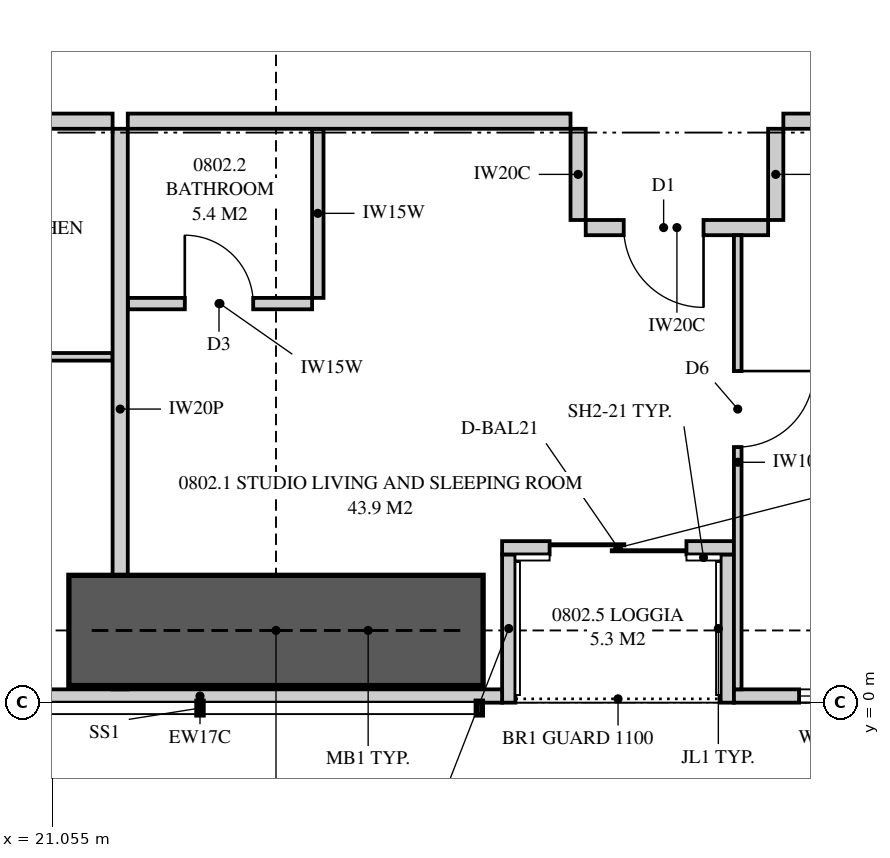
"""IFC4 building model, lengths in metres.
Left out: names, types, materials, properties, quantities, classifications, styles, units other than length and angle.
Written with IfcOpenShell. Run it as: python <this file> out.ifc"""

import sys

from ifc_helpers import new_model, si_unit, direction, frame, frame_2d, origin, place, context, subcontext, project, spatial, polyline, rectangle, outline, extrude, element, fill, save


model = new_model("IFC4")
c1 = context("Model", 3, precision=1e-05, world=origin(), true_north=direction((0.0, 1.0)))
c2 = subcontext(c1, "Body", "Model", "MODEL_VIEW")
j1 = project(units=[si_unit("LENGTHUNIT", "METRE"), si_unit("PLANEANGLEUNIT", "RADIAN")], contexts=[c1])
p1 = place(None, origin())
s1 = spatial("IfcSite", under=j1, at=p1, CompositionType="ELEMENT")
p2 = place(p1, origin())
s2 = spatial("IfcBuilding", under=s1, at=p2, CompositionType="ELEMENT")
p3 = place(p2, frame((0.0, 0.0, 34.4)))
s3 = spatial("IfcBuildingStorey", under=s2, at=p3, CompositionType="ELEMENT", Elevation=34.4)
p4 = place(p3, frame((19.025, 0.087, 0.0), z_axis=(0.0, 0.0, 1.0), x_axis=(1.0, 0.0, 0.0)))
e1 = element("IfcWall", 1, at=p4, inside=s3, PredefinedType="SOLIDWALL", context=c2, shape_type="SweptSolid", body=[
    extrude(rectangle(XDim=7.95, YDim=0.175, at=frame_2d((3.975, 0.0))), origin(), (0.0, 0.0, 1.0), 2.15),
])
p5 = place(p3, frame((30.025, 0.087, 0.0), z_axis=(0.0, 0.0, 1.0), x_axis=(1.0, 0.0, 0.0)))
e2 = element("IfcWall", 2, at=p5, inside=s3, PredefinedType="SOLIDWALL", context=c2, shape_type="SweptSolid", body=[
    extrude(outline(polyline([(0.0, 0.0), (8.075, 0.0), (8.075, 3.11), (5.179, 3.11), (5.179, 2.15), (5.131, 2.15), (5.131, 3.11), (4.975, 3.11), (4.975, 2.15), (0.0, 2.15), (0.0, 0.0)])), frame((0.0, 0.087, 0.0), z_axis=(0.0, -1.0, 0.0), x_axis=(1.0, 0.0, 0.0)), (0.0, 0.0, 1.0), 0.175),
])
p6 = place(p5, frame((0.857, 0.0, 0.4)))
e3 = element("IfcOpeningElement", 3, at=p6, cuts=e2, PredefinedType="OPENING", context=c2, shape_type="SweptSolid", body=[
    extrude(rectangle(XDim=1.2, YDim=1.7, at=frame_2d((0.6, 0.85))), frame((0.0, 0.097, 0.0), z_axis=(0.0, -1.0, 0.0), x_axis=(1.0, 0.0, 0.0)), (0.0, 0.0, 1.0), 0.195),
])
p7 = place(p3, frame((26.975, 2.038, 0.0), z_axis=(0.0, 0.0, 1.0), x_axis=(1.0, 0.0, 0.0)))
e4 = element("IfcWall", 4, at=p7, inside=s3, PredefinedType="SOLIDWALL", context=c2, shape_type="SweptSolid", body=[
    extrude(rectangle(XDim=3.05, YDim=0.175, at=frame_2d((1.525, 0.0))), origin(), (0.0, 0.0, 1.0), 3.11),
])
p8 = place(p7, frame((0.625, 0.0, 0.0)))
e5 = element("IfcOpeningElement", 5, at=p8, cuts=e4, PredefinedType="OPENING", context=c2, shape_type="SweptSolid", body=[
    extrude(rectangle(XDim=1.8, YDim=2.1, at=frame_2d((0.9, 1.05))), frame((0.0, 0.097, 0.0), z_axis=(0.0, -1.0, 0.0), x_axis=(1.0, 0.0, 0.0)), (0.0, 0.0, 1.0), 0.195),
])
for number, where, z_axis, x_axis in (
    (6, (27.062, 0.0, 0.0), (0.0, 0.0, 1.0), (0.0, 1.0, 0.0)),
    (7, (29.938, 0.0, 0.0), (0.0, 0.0, 1.0), (0.0, 1.0, 0.0)),
):
    element("IfcWall", number, at=place(p3, frame(where, z_axis=z_axis, x_axis=x_axis)), inside=s3, PredefinedType="SOLIDWALL", context=c2, shape_type="SweptSolid", body=[
        extrude(outline(polyline([(0.0, 0.0), (1.95, 0.0), (1.95, 3.11), (1.75, 3.11), (1.75, 2.15), (0.15, 2.15), (0.15, 3.11), (0.0, 3.11), (0.0, 0.0)])), frame((0.0, 0.087, 0.0), z_axis=(0.0, -1.0, 0.0), x_axis=(1.0, 0.0, 0.0)), (0.0, 0.0, 1.0), 0.175),
    ])
p9 = place(p3, frame((21.95, 0.175, 0.0), z_axis=(0.0, 0.0, 1.0), x_axis=(0.0, 1.0, 0.0)))
e8 = element("IfcWall", 8, at=p9, inside=s3, PredefinedType="PARTITIONING", context=c2, shape_type="SweptSolid", body=[
    extrude(outline(polyline([(0.529, 2.15), (0.0, 2.15), (0.0, 0.0), (0.529, 0.0), (0.529, 0.09), (1.021, 0.09), (1.021, 0.0), (7.375, 0.0), (7.375, 3.11), (1.685, 3.11), (1.685, 2.15), (1.021, 2.15), (1.021, 2.06), (0.529, 2.06), (0.529, 2.15)])), frame((0.0, 0.1, 0.0), z_axis=(0.0, -1.0, 0.0), x_axis=(1.0, 0.0, 0.0)), (0.0, 0.0, 1.0), 0.2),
])
p10 = place(p3, frame((17.725, 7.65, 0.0), z_axis=(0.0, 0.0, 1.0), x_axis=(1.0, 0.0, 0.0)))
e9 = element("IfcWall", 9, at=p10, inside=s3, PredefinedType="PARTITIONING", context=c2, shape_type="SweptSolid", body=[
    extrude(rectangle(XDim=4.125, YDim=0.2, at=frame_2d((2.062, 0.0))), origin(), (0.0, 0.0, 1.0), 3.11),
])
p11 = place(p10, frame((0.2, 0.0, 0.0)))
e10 = element("IfcOpeningElement", 10, at=p11, cuts=e9, PredefinedType="OPENING", context=c2, shape_type="SweptSolid", body=[
    extrude(rectangle(XDim=1.05, YDim=2.2, at=frame_2d((0.525, 1.1))), frame((0.0, 0.11, 0.0), z_axis=(0.0, -1.0, 0.0), x_axis=(1.0, 0.0, 0.0)), (0.0, 0.0, 1.0), 0.22),
])
p12 = place(p3, frame((19.2, 4.55, 0.0), z_axis=(0.0, 0.0, 1.0), x_axis=(1.0, 0.0, 0.0)))
e11 = element("IfcWall", 11, at=p12, inside=s3, PredefinedType="PARTITIONING", context=c2, shape_type="SweptSolid", body=[
    extrude(rectangle(XDim=2.65, YDim=0.1, at=frame_2d((1.325, 0.0))), origin(), (0.0, 0.0, 1.0), 3.11),
])
p13 = place(p12, frame((0.85, 0.0, 0.0)))
e12 = element("IfcOpeningElement", 12, at=p13, cuts=e11, PredefinedType="OPENING", context=c2, shape_type="SweptSolid", body=[
    extrude(rectangle(XDim=0.9, YDim=2.1, at=frame_2d((0.45, 1.05))), frame((0.0, 0.06, 0.0), z_axis=(0.0, -1.0, 0.0), x_axis=(1.0, 0.0, 0.0)), (0.0, 0.0, 1.0), 0.12),
])
p14 = place(p3, frame((22.05, 7.65, 0.0), z_axis=(0.0, 0.0, 1.0), x_axis=(1.0, 0.0, 0.0)))
e13 = element("IfcWall", 13, at=p14, inside=s3, PredefinedType="PARTITIONING", context=c2, shape_type="SweptSolid", body=[
    extrude(outline(polyline([(0.0, 0.0), (5.825, 0.0), (5.825, 3.11), (2.287, 3.11), (2.287, 2.541), (1.613, 2.541), (1.613, 3.11), (0.0, 3.11), (0.0, 0.0)])), frame((0.0, 0.1, 0.0), z_axis=(0.0, -1.0, 0.0), x_axis=(1.0, 0.0, 0.0)), (0.0, 0.0, 1.0), 0.2),
])
p15 = place(p3, frame((22.05, 5.25, 0.0), z_axis=(0.0, 0.0, 1.0), x_axis=(1.0, 0.0, 0.0)))
e14 = element("IfcWall", 14, at=p15, inside=s3, PredefinedType="PLUMBINGWALL", context=c2, shape_type="SweptSolid", body=[
    extrude(outline(polyline([(0.0, 0.0), (2.425, 0.0), (2.425, 3.11), (2.262, 3.11), (2.262, 2.541), (1.638, 2.541), (1.638, 3.11), (0.0, 3.11), (0.0, 0.0)])), frame((0.0, 0.075, 0.0), z_axis=(0.0, -1.0, 0.0), x_axis=(1.0, 0.0, 0.0)), (0.0, 0.0, 1.0), 0.15),
])
p16 = place(p15, frame((0.75, 0.0, 0.0)))
e15 = element("IfcOpeningElement", 15, at=p16, cuts=e14, PredefinedType="OPENING", context=c2, shape_type="SweptSolid", body=[
    extrude(rectangle(XDim=0.9, YDim=2.1, at=frame_2d((0.45, 1.05))), frame((0.0, 0.085, 0.0), z_axis=(0.0, -1.0, 0.0), x_axis=(1.0, 0.0, 0.0)), (0.0, 0.0, 1.0), 0.17),
])
p17 = place(p3, frame((24.55, 5.325, 0.0), z_axis=(0.0, 0.0, 1.0), x_axis=(0.0, 1.0, 0.0)))
e16 = element("IfcWall", 16, at=p17, inside=s3, PredefinedType="PLUMBINGWALL", context=c2, shape_type="SweptSolid", body=[
    extrude(rectangle(XDim=2.225, YDim=0.15, at=frame_2d((1.113, 0.0))), origin(), (0.0, 0.0, 1.0), 3.11),
])
p18 = place(p3, frame((30.075, 0.175, 0.0), z_axis=(0.0, 0.0, 1.0), x_axis=(0.0, 1.0, 0.0)))
e17 = element("IfcWall", 17, at=p18, inside=s3, PredefinedType="PARTITIONING", context=c2, shape_type="SweptSolid", body=[
    extrude(outline(polyline([(0.0, 0.0), (5.975, 0.0), (5.975, 3.11), (1.635, 3.11), (1.635, 2.15), (0.0, 2.15), (0.0, 3.11), (0.0, 0.0)])), frame((0.0, 0.05, 0.0), z_axis=(0.0, -1.0, 0.0), x_axis=(1.0, 0.0, 0.0)), (0.0, 0.0, 1.0), 0.1),
])
p19 = place(p18, frame((3.188, 0.0, 0.0)))
e18 = element("IfcOpeningElement", 18, at=p19, cuts=e17, PredefinedType="OPENING", context=c2, shape_type="SweptSolid", body=[
    extrude(rectangle(XDim=1.0, YDim=2.1, at=frame_2d((0.5, 1.05))), frame((0.0, 0.06, 0.0), z_axis=(0.0, -1.0, 0.0), x_axis=(1.0, 0.0, 0.0)), (0.0, 0.0, 1.0), 0.12),
])
p20 = place(p3, frame((30.675, 7.65, 0.0), z_axis=(0.0, 0.0, 1.0), x_axis=(1.0, 0.0, 0.0)))
e19 = element("IfcWall", 19, at=p20, inside=s3, PredefinedType="PARTITIONING", context=c2, shape_type="SweptSolid", body=[
    extrude(outline(polyline([(0.0, 0.0), (5.425, 0.0), (5.425, 3.11), (4.662, 3.11), (4.662, 2.541), (3.988, 2.541), (3.988, 3.11), (0.0, 3.11), (0.0, 0.0)])), frame((0.0, 0.1, 0.0), z_axis=(0.0, -1.0, 0.0), x_axis=(1.0, 0.0, 0.0)), (0.0, 0.0, 1.0), 0.2),
])
p21 = place(p3, frame((28.075, 6.25, 0.0), z_axis=(0.0, 0.0, 1.0), x_axis=(1.0, 0.0, 0.0)))
e20 = element("IfcWall", 20, at=p21, inside=s3, PredefinedType="PARTITIONING", context=c2, shape_type="SweptSolid", body=[
    extrude(rectangle(XDim=2.4, YDim=0.2, at=frame_2d((1.2, 0.0))), origin(), (0.0, 0.0, 1.0), 3.11),
])
p22 = place(p21, frame((0.5, 0.0, 0.0)))
e21 = element("IfcOpeningElement", 21, at=p22, cuts=e20, PredefinedType="OPENING", context=c2, shape_type="SweptSolid", body=[
    extrude(rectangle(XDim=1.05, YDim=2.2, at=frame_2d((0.525, 1.1))), frame((0.0, 0.11, 0.0), z_axis=(0.0, -1.0, 0.0), x_axis=(1.0, 0.0, 0.0)), (0.0, 0.0, 1.0), 0.22),
])
for number, where, z_axis, x_axis in (
    (22, (27.975, 7.55, 0.0), (0.0, 0.0, 1.0), (0.0, -1.0, 0.0)),
    (23, (30.575, 7.55, 0.0), (0.0, 0.0, 1.0), (0.0, -1.0, 0.0)),
):
    element("IfcWall", number, at=place(p3, frame(where, z_axis=z_axis, x_axis=x_axis)), inside=s3, PredefinedType="PARTITIONING", context=c2, shape_type="SweptSolid", body=[
        extrude(rectangle(XDim=1.2, YDim=0.2, at=frame_2d((0.6, 0.0))), origin(), (0.0, 0.0, 1.0), 3.11),
    ])
p23 = place(p3, frame((21.275, 0.95, 0.0), z_axis=(0.0, 0.0, 1.0), x_axis=(1.0, 0.0, 0.0)))
e24 = element("IfcWall", 24, at=p23, inside=s3, PredefinedType="SHEAR", context=c2, shape_type="SweptSolid", body=[
    extrude(rectangle(XDim=5.45, YDim=1.45, at=frame_2d((2.725, 0.0))), origin(), (0.0, 0.0, 1.0), 3.35),
])
p24 = place(p8, origin())
e25 = element("IfcDoor", 25, at=p24, inside=s3, OperationType="SLIDING_TO_LEFT", PredefinedType="DOOR", context=c2, shape_type="SweptSolid", body=[
    extrude(rectangle(XDim=1.8, YDim=2.1, at=frame_2d((0.9, 1.05))), frame((0.0, 0.025, 0.0), z_axis=(0.0, -1.0, 0.0), x_axis=(1.0, 0.0, 0.0)), (0.0, 0.0, 1.0), 0.05),
])
fill(e5, e25)
p25 = place(p6, origin())
e26 = element("IfcWindow", 26, at=p25, inside=s3, PartitioningType="SINGLE_PANEL", PredefinedType="WINDOW", context=c2, shape_type="SweptSolid", body=[
    extrude(rectangle(XDim=1.2, YDim=1.7, at=frame_2d((0.6, 0.85))), frame((0.0, 0.03, 0.0), z_axis=(0.0, -1.0, 0.0), x_axis=(1.0, 0.0, 0.0)), (0.0, 0.0, 1.0), 0.06),
])
fill(e3, e26)
p26 = place(p22, frame((1.05, 0.0, 0.0), z_axis=(0.0, 0.0, 1.0), x_axis=(-1.0, 0.0, 0.0)))
e27 = element("IfcDoor", 27, at=p26, inside=s3, OperationType="SINGLE_SWING_LEFT", PredefinedType="DOOR", context=c2, shape_type="SweptSolid", body=[
    extrude(rectangle(XDim=1.05, YDim=2.2, at=frame_2d((0.525, 1.1))), frame((0.0, 0.025, 0.0), z_axis=(0.0, -1.0, 0.0), x_axis=(1.0, 0.0, 0.0)), (0.0, 0.0, 1.0), 0.05),
])
fill(e21, e27)
p27 = place(p16, origin())
e28 = element("IfcDoor", 28, at=p27, inside=s3, OperationType="SINGLE_SWING_LEFT", PredefinedType="DOOR", context=c2, shape_type="SweptSolid", body=[
    extrude(rectangle(XDim=0.9, YDim=2.1, at=frame_2d((0.45, 1.05))), frame((0.0, 0.025, 0.0), z_axis=(0.0, -1.0, 0.0), x_axis=(1.0, 0.0, 0.0)), (0.0, 0.0, 1.0), 0.05),
])
fill(e15, e28)
p28 = place(p19, frame((1.0, 0.0, 0.0), z_axis=(0.0, 0.0, 1.0), x_axis=(-1.0, 0.0, 0.0)))
e29 = element("IfcDoor", 29, at=p28, inside=s3, OperationType="SINGLE_SWING_LEFT", PredefinedType="DOOR", context=c2, shape_type="SweptSolid", body=[
    extrude(rectangle(XDim=1.0, YDim=2.1, at=frame_2d((0.5, 1.05))), frame((0.0, 0.025, 0.0), z_axis=(0.0, -1.0, 0.0), x_axis=(1.0, 0.0, 0.0)), (0.0, 0.0, 1.0), 0.05),
])
fill(e18, e29)
save(model, sys.argv[1])
